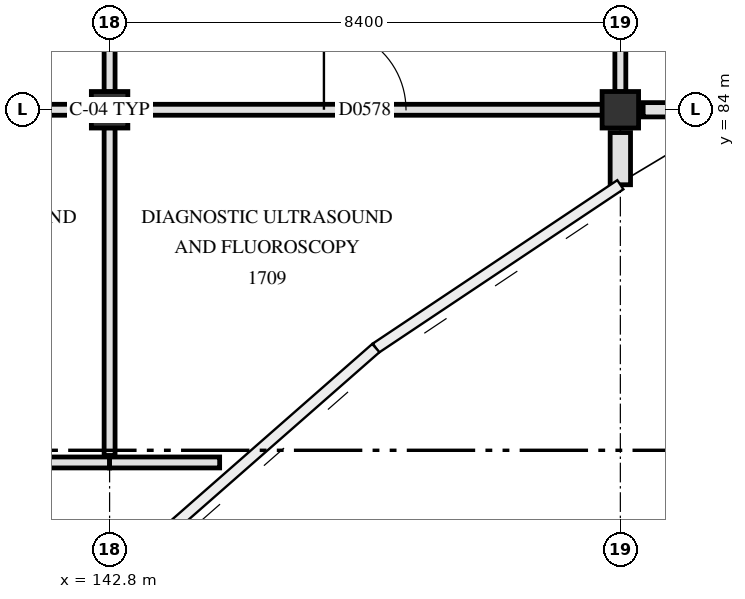
"""IFC4 building model, lengths in metres.
Left out: names, types, materials, properties, quantities, classifications, styles, units other than length and angle.
Written with IfcOpenShell. Run it as: python <this file> out.ifc"""

import sys

from ifc_helpers import new_model, si_unit, direction, frame, frame_2d, origin, origin_2d, place, context, subcontext, project, spatial, rectangle, extrude, element, fill, save


model = new_model("IFC4")
c1 = context("Model", 3, precision=1e-05, world=origin(), true_north=direction((0.0, 1.0)))
c2 = subcontext(c1, "Body", "Model", "MODEL_VIEW")
j1 = project(units=[si_unit("LENGTHUNIT", "METRE"), si_unit("PLANEANGLEUNIT", "RADIAN")], contexts=[c1])
p1 = place(None, origin())
s1 = spatial("IfcSite", under=j1, at=p1, CompositionType="ELEMENT")
p2 = place(p1, origin())
s2 = spatial("IfcBuilding", under=s1, at=p2, CompositionType="ELEMENT")
p3 = place(p2, origin())
s3 = spatial("IfcBuildingStorey", under=s2, at=p3, CompositionType="ELEMENT", Elevation=0.0)
for number, where, z_axis, x_axis in (
    (1, (142.8, 84.0, 0.0), (0.0, 0.0, 1.0), (1.0, 0.0, 0.0)),
    (2, (151.2, 84.0, 0.0), (0.0, 0.0, 1.0), (1.0, 0.0, 0.0)),
):
    element("IfcColumn", number, at=place(p3, frame(where, z_axis=z_axis, x_axis=x_axis)), inside=s3, PredefinedType="COLUMN", context=c2, shape_type="SweptSolid", body=[
        extrude(rectangle(XDim=0.6, YDim=0.6, at=origin_2d()), origin(), (0.0, 0.0, 1.0), 4.8),
    ])
p4 = place(p3, frame((153.274, 84.0, 0.0), z_axis=(0.0, 0.0, 1.0), x_axis=(-1.0, 0.0, 0.0)))
e3 = element("IfcWall", 3, at=p4, inside=s3, PredefinedType="SOLIDWALL", context=c2, shape_type="SweptSolid", body=[
    extrude(rectangle(XDim=1.699, YDim=0.235, at=frame_2d((0.85, 0.0))), origin(), (0.0, 0.0, 1.0), 4.49),
])
p5 = place(p3, frame((151.2, 83.625, 0.0), z_axis=(0.0, 0.0, 1.0), x_axis=(0.0, -1.0, 0.0)))
e4 = element("IfcWall", 4, at=p5, inside=s3, PredefinedType="SOLIDWALL", context=c2, shape_type="SweptSolid", body=[
    extrude(rectangle(XDim=0.858, YDim=0.335, at=frame_2d((0.429, 0.0))), origin(), (0.0, 0.0, 1.0), 4.49),
])
p6 = place(p3, frame((137.0, 78.2, 0.0), z_axis=(0.0, 0.0, 1.0), x_axis=(1.0, 0.0, 0.0)))
e5 = element("IfcWall", 5, at=p6, inside=s3, PredefinedType="PARTITIONING", context=c2, shape_type="SweptSolid", body=[
    extrude(rectangle(XDim=5.8, YDim=0.18, at=frame_2d((2.9, 0.0))), origin(), (0.0, 0.0, 1.0), 4.49),
])
p7 = place(p6, frame((2.31, 0.0, 0.0)))
e6 = element("IfcOpeningElement", 6, at=p7, cuts=e5, PredefinedType="OPENING", context=c2, shape_type="SweptSolid", body=[
    extrude(rectangle(XDim=1.18, YDim=2.18, at=frame_2d((0.59, 1.09))), frame((0.0, 0.1, 0.0), z_axis=(0.0, -1.0, 0.0), x_axis=(1.0, 0.0, 0.0)), (0.0, 0.0, 1.0), 0.2),
])
p8 = place(p3, frame((142.8, 78.2, 0.0), z_axis=(0.0, 0.0, 1.0), x_axis=(1.0, 0.0, 0.0)))
e7 = element("IfcWall", 7, at=p8, inside=s3, PredefinedType="PARTITIONING", context=c2, shape_type="SweptSolid", body=[
    extrude(rectangle(XDim=1.81, YDim=0.18, at=frame_2d((0.905, 0.0))), origin(), (0.0, 0.0, 1.0), 4.49),
])
p9 = place(p3, frame((137.0, 84.0, 0.0), z_axis=(0.0, 0.0, 1.0), x_axis=(1.0, 0.0, 0.0)))
e8 = element("IfcWall", 8, at=p9, inside=s3, PredefinedType="PARTITIONING", context=c2, shape_type="SweptSolid", body=[
    extrude(rectangle(XDim=5.505, YDim=0.18, at=frame_2d((2.752, 0.0))), origin(), (0.0, 0.0, 1.0), 3.84),
])
p10 = place(p3, frame((143.095, 84.0, 0.0), z_axis=(0.0, 0.0, 1.0), x_axis=(1.0, 0.0, 0.0)))
e9 = element("IfcWall", 9, at=p10, inside=s3, PredefinedType="PARTITIONING", context=c2, shape_type="SweptSolid", body=[
    extrude(rectangle(XDim=7.81, YDim=0.18, at=frame_2d((3.905, 0.0))), origin(), (0.0, 0.0, 1.0), 3.84),
])
p11 = place(p10, frame((3.23, 0.0, 0.0)))
e10 = element("IfcOpeningElement", 10, at=p11, cuts=e9, PredefinedType="OPENING", context=c2, shape_type="SweptSolid", body=[
    extrude(rectangle(XDim=1.35, YDim=2.2, at=frame_2d((0.675, 1.1))), frame((0.0, 0.1, 0.0), z_axis=(0.0, -1.0, 0.0), x_axis=(1.0, 0.0, 0.0)), (0.0, 0.0, 1.0), 0.2),
])
p12 = place(p3, frame((142.8, 78.315, 0.0), z_axis=(0.0, 0.0, 1.0), x_axis=(0.0, 1.0, 0.0)))
e11 = element("IfcWall", 11, at=p12, inside=s3, PredefinedType="PARTITIONING", context=c2, shape_type="SweptSolid", body=[
    extrude(rectangle(XDim=5.39, YDim=0.18, at=frame_2d((2.695, 0.0))), origin(), (0.0, 0.0, 1.0), 4.49),
])
for number, where, z_axis, x_axis in (
    (12, (142.8, 84.295, 0.0), (0.0, 0.0, 1.0), (0.0, 1.0, 0.0)),
    (13, (151.2, 84.295, 0.0), (0.0, 0.0, 1.0), (0.0, 1.0, 0.0)),
):
    element("IfcWall", number, at=place(p3, frame(where, z_axis=z_axis, x_axis=x_axis)), inside=s3, PredefinedType="PARTITIONING", context=c2, shape_type="SweptSolid", body=[
        extrude(rectangle(XDim=7.71, YDim=0.18, at=frame_2d((3.855, 0.0))), origin(), (0.0, 0.0, 1.0), 3.89),
    ])
p13 = place(p11, origin())
e14 = element("IfcDoor", 14, at=p13, inside=s3, OperationType="SINGLE_SWING_LEFT", PredefinedType="DOOR", context=c2, shape_type="SweptSolid", body=[
    extrude(rectangle(XDim=1.35, YDim=2.2, at=frame_2d((0.675, 1.1))), frame((0.0, 0.025, 0.0), z_axis=(0.0, -1.0, 0.0), x_axis=(1.0, 0.0, 0.0)), (0.0, 0.0, 1.0), 0.05),
])
fill(e10, e14)
save(model, sys.argv[1])
